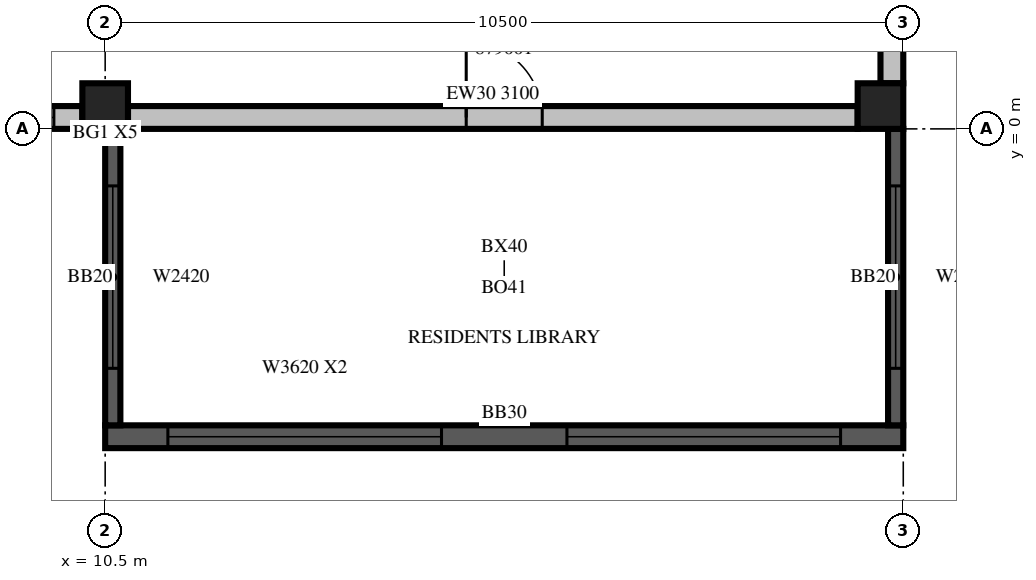
"""IFC4 building model, lengths in metres.
Left out: names, types, materials, properties, quantities, classifications, styles, units other than length and angle.
Written with IfcOpenShell. Run it as: python <this file> out.ifc"""

import sys

from ifc_helpers import new_model, si_unit, direction, frame, frame_2d, origin, origin_2d, place, context, subcontext, project, spatial, rectangle, extrude, source, transform, mapped, element, fill, save


model = new_model("IFC4")
c1 = context("Model", 3, precision=1e-05, world=origin(), true_north=direction((0.0, 1.0)))
c2 = subcontext(c1, "Body", "Model", "MODEL_VIEW")
j1 = project(units=[si_unit("LENGTHUNIT", "METRE"), si_unit("PLANEANGLEUNIT", "RADIAN")], contexts=[c1])
p1 = place(None, origin())
s1 = spatial("IfcSite", under=j1, at=p1, CompositionType="ELEMENT")
p2 = place(p1, origin())
s2 = spatial("IfcBuilding", under=s1, at=p2, CompositionType="ELEMENT")
p3 = place(p2, frame((0.0, 0.0, 337.0)))
s3 = spatial("IfcBuildingStorey", under=s2, at=p3, CompositionType="ELEMENT", Elevation=337.0)
m1 = source(origin(), c2, "Body", "SweptSolid", [
    extrude(rectangle(XDim=0.6, YDim=0.6, at=origin_2d()), origin(), (0.0, 0.0, 1.0), 3.5),
])
for number, where, z_axis, x_axis in (
    (1, (10.5, 0.3, 0.0), (0.0, 0.0, 1.0), (1.0, 0.0, 0.0)),
    (2, (20.7, 0.3, 0.0), (0.0, 0.0, 1.0), (1.0, 0.0, 0.0)),
):
    element("IfcColumn", number, at=place(p3, frame(where, z_axis=z_axis, x_axis=x_axis)), inside=s3, PredefinedType="COLUMN", context=c2, shape_type="MappedRepresentation", body=[
        mapped(m1, transform((0.0, 0.0, 0.0), scale=1.0)),
    ])
p4 = place(p3, frame((10.5, -4.05, 0.0), z_axis=(0.0, 0.0, 1.0), x_axis=(1.0, 0.0, 0.0)))
e3 = element("IfcWall", 3, at=p4, inside=s3, PredefinedType="SOLIDWALL", context=c2, shape_type="SweptSolid", body=[
    extrude(rectangle(XDim=10.5, YDim=0.3, at=frame_2d((5.25, 0.0))), origin(), (0.0, 0.0, 1.0), 3.1),
])
m2 = source(origin(), c2, "Body", "SweptSolid", [
    extrude(rectangle(XDim=3.6, YDim=2.0, at=frame_2d((1.8, 1.0))), frame((0.0, 0.16, 0.0), z_axis=(0.0, -1.0, 0.0), x_axis=(1.0, 0.0, 0.0)), (0.0, 0.0, 1.0), 0.32),
])
p5 = place(p4, frame((0.825, 0.0, 0.6)))
e4 = element("IfcOpeningElement", 4, at=p5, cuts=e3, PredefinedType="OPENING", context=c2, shape_type="MappedRepresentation", body=[
    mapped(m2, transform((0.0, 0.0, 0.0), scale=1.0)),
])
p6 = place(p4, frame((6.075, 0.0, 0.6)))
e5 = element("IfcOpeningElement", 5, at=p6, cuts=e3, PredefinedType="OPENING", context=c2, shape_type="MappedRepresentation", body=[
    mapped(m2, transform((0.0, 0.0, 0.0), scale=1.0)),
])
m3 = source(origin(), c2, "Body", "SweptSolid", [
    extrude(rectangle(XDim=3.9, YDim=0.2, at=frame_2d((1.95, 0.0))), origin(), (0.0, 0.0, 1.0), 3.1),
])
p7 = place(p3, frame((10.6, 0.0, 0.0), z_axis=(0.0, 0.0, 1.0), x_axis=(0.0, -1.0, 0.0)))
e6 = element("IfcWall", 6, at=p7, inside=s3, PredefinedType="SOLIDWALL", context=c2, shape_type="MappedRepresentation", body=[
    mapped(m3, transform((0.0, 0.0, 0.0), scale=1.0)),
])
m4 = source(origin(), c2, "Body", "SweptSolid", [
    extrude(rectangle(XDim=2.4, YDim=2.0, at=frame_2d((1.2, 1.0))), frame((0.0, 0.11, 0.0), z_axis=(0.0, -1.0, 0.0), x_axis=(1.0, 0.0, 0.0)), (0.0, 0.0, 1.0), 0.22),
])
p8 = place(p7, frame((0.75, 0.0, 0.6)))
e7 = element("IfcOpeningElement", 7, at=p8, cuts=e6, PredefinedType="OPENING", context=c2, shape_type="MappedRepresentation", body=[
    mapped(m4, transform((0.0, 0.0, 0.0), scale=1.0)),
])
p9 = place(p3, frame((20.9, 0.0, 0.0), z_axis=(0.0, 0.0, 1.0), x_axis=(0.0, -1.0, 0.0)))
e8 = element("IfcWall", 8, at=p9, inside=s3, PredefinedType="SOLIDWALL", context=c2, shape_type="MappedRepresentation", body=[
    mapped(m3, transform((0.0, 0.0, 0.0), scale=1.0)),
])
p10 = place(p9, frame((0.75, 0.0, 0.6)))
e9 = element("IfcOpeningElement", 9, at=p10, cuts=e8, PredefinedType="OPENING", context=c2, shape_type="MappedRepresentation", body=[
    mapped(m4, transform((0.0, 0.0, 0.0), scale=1.0)),
])
m5 = source(origin(), c2, "Body", "SweptSolid", [
    extrude(rectangle(XDim=6.0, YDim=0.3, at=frame_2d((3.0, 0.0))), origin(), (0.0, 0.0, 1.0), 3.1),
])
p11 = place(p3, frame((4.2, 0.15, 0.0), z_axis=(0.0, 0.0, 1.0), x_axis=(1.0, 0.0, 0.0)))
e10 = element("IfcWall", 10, at=p11, inside=s3, PredefinedType="STANDARD", context=c2, shape_type="MappedRepresentation", body=[
    mapped(m5, transform((0.0, 0.0, 0.0), scale=1.0)),
])
m6 = source(origin(), c2, "Body", "SweptSolid", [
    extrude(rectangle(XDim=1.8, YDim=2.0, at=frame_2d((0.9, 1.0))), frame((0.0, 0.16, 0.0), z_axis=(0.0, -1.0, 0.0), x_axis=(1.0, 0.0, 0.0)), (0.0, 0.0, 1.0), 0.32),
])
p12 = place(p11, frame((0.675, 0.0, 0.6)))
e11 = element("IfcOpeningElement", 11, at=p12, cuts=e10, PredefinedType="OPENING", context=c2, shape_type="MappedRepresentation", body=[
    mapped(m6, transform((0.0, 0.0, 0.0), scale=1.0)),
])
p13 = place(p11, frame((3.825, 0.0, 0.6)))
e12 = element("IfcOpeningElement", 12, at=p13, cuts=e10, PredefinedType="OPENING", context=c2, shape_type="MappedRepresentation", body=[
    mapped(m6, transform((0.0, 0.0, 0.0), scale=1.0)),
])
m7 = source(origin(), c2, "Body", "SweptSolid", [
    extrude(rectangle(XDim=9.6, YDim=0.3, at=frame_2d((4.8, 0.0))), origin(), (0.0, 0.0, 1.0), 3.1),
])
p14 = place(p3, frame((10.8, 0.15, 0.0), z_axis=(0.0, 0.0, 1.0), x_axis=(1.0, 0.0, 0.0)))
e13 = element("IfcWall", 13, at=p14, inside=s3, PredefinedType="STANDARD", context=c2, shape_type="MappedRepresentation", body=[
    mapped(m7, transform((0.0, 0.0, 0.0), scale=1.0)),
])
m8 = source(origin(), c2, "Body", "SweptSolid", [
    extrude(rectangle(XDim=1.0, YDim=2.1, at=frame_2d((0.5, 1.05))), frame((0.0, 0.16, 0.0), z_axis=(0.0, -1.0, 0.0), x_axis=(1.0, 0.0, 0.0)), (0.0, 0.0, 1.0), 0.32),
])
p15 = place(p14, frame((4.45, 0.0, 0.0)))
e14 = element("IfcOpeningElement", 14, at=p15, cuts=e13, PredefinedType="OPENING", context=c2, shape_type="MappedRepresentation", body=[
    mapped(m8, transform((0.0, 0.0, 0.0), scale=1.0)),
])
m9 = source(origin(), c2, "Body", "SweptSolid", [
    extrude(rectangle(XDim=3.0, YDim=0.3, at=frame_2d((1.5, 0.0))), origin(), (0.0, 0.0, 1.0), 3.1),
])
p16 = place(p3, frame((20.85, 0.6, 0.0), z_axis=(0.0, 0.0, 1.0), x_axis=(0.0, 1.0, 0.0)))
e15 = element("IfcWall", 15, at=p16, inside=s3, PredefinedType="STANDARD", context=c2, shape_type="MappedRepresentation", body=[
    mapped(m9, transform((0.0, 0.0, 0.0), scale=1.0)),
])
m10 = source(origin(), c2, "Body", "SweptSolid", [
    extrude(rectangle(XDim=1.2, YDim=2.0, at=frame_2d((0.6, 1.0))), frame((0.0, 0.16, 0.0), z_axis=(0.0, -1.0, 0.0), x_axis=(1.0, 0.0, 0.0)), (0.0, 0.0, 1.0), 0.32),
])
p17 = place(p16, frame((1.425, 0.0, 0.6)))
e16 = element("IfcOpeningElement", 16, at=p17, cuts=e15, PredefinedType="OPENING", context=c2, shape_type="MappedRepresentation", body=[
    mapped(m10, transform((0.0, 0.0, 0.0), scale=1.0)),
])
m11 = source(origin(), c2, "Body", "SweptSolid", [
    extrude(rectangle(XDim=3.6, YDim=2.0, at=frame_2d((1.8, 1.0))), frame((0.0, 0.03, 0.0), z_axis=(0.0, -1.0, 0.0), x_axis=(1.0, 0.0, 0.0)), (0.0, 0.0, 1.0), 0.06),
])
p18 = place(p5, origin())
e17 = element("IfcWindow", 17, at=p18, inside=s3, PartitioningType="SINGLE_PANEL", PredefinedType="WINDOW", context=c2, shape_type="MappedRepresentation", body=[
    mapped(m11, transform((0.0, 0.0, 0.0), scale=1.0)),
])
fill(e4, e17)
p19 = place(p6, origin())
e18 = element("IfcWindow", 18, at=p19, inside=s3, PartitioningType="SINGLE_PANEL", PredefinedType="WINDOW", context=c2, shape_type="MappedRepresentation", body=[
    mapped(m11, transform((0.0, 0.0, 0.0), scale=1.0)),
])
fill(e5, e18)
m12 = source(origin(), c2, "Body", "SweptSolid", [
    extrude(rectangle(XDim=2.4, YDim=2.0, at=frame_2d((1.2, 1.0))), frame((0.0, 0.03, 0.0), z_axis=(0.0, -1.0, 0.0), x_axis=(1.0, 0.0, 0.0)), (0.0, 0.0, 1.0), 0.06),
])
p20 = place(p8, origin())
e19 = element("IfcWindow", 19, at=p20, inside=s3, PartitioningType="SINGLE_PANEL", PredefinedType="WINDOW", context=c2, shape_type="MappedRepresentation", body=[
    mapped(m12, transform((0.0, 0.0, 0.0), scale=1.0)),
])
fill(e7, e19)
p21 = place(p10, origin())
e20 = element("IfcWindow", 20, at=p21, inside=s3, PartitioningType="SINGLE_PANEL", PredefinedType="WINDOW", context=c2, shape_type="MappedRepresentation", body=[
    mapped(m12, transform((0.0, 0.0, 0.0), scale=1.0)),
])
fill(e9, e20)
m13 = source(origin(), c2, "Body", "SweptSolid", [
    extrude(rectangle(XDim=1.8, YDim=2.0, at=frame_2d((0.9, 1.0))), frame((0.0, 0.03, 0.0), z_axis=(0.0, -1.0, 0.0), x_axis=(1.0, 0.0, 0.0)), (0.0, 0.0, 1.0), 0.06),
])
p22 = place(p13, origin())
e21 = element("IfcWindow", 21, at=p22, inside=s3, PartitioningType="SINGLE_PANEL", PredefinedType="WINDOW", context=c2, shape_type="MappedRepresentation", body=[
    mapped(m13, transform((0.0, 0.0, 0.0), scale=1.0)),
])
fill(e12, e21)
m14 = source(origin(), c2, "Body", "SweptSolid", [
    extrude(rectangle(XDim=1.0, YDim=2.1, at=frame_2d((0.5, 1.05))), frame((0.0, 0.025, 0.0), z_axis=(0.0, -1.0, 0.0), x_axis=(1.0, 0.0, 0.0)), (0.0, 0.0, 1.0), 0.05),
])
p23 = place(p15, origin())
e22 = element("IfcDoor", 22, at=p23, inside=s3, OperationType="SINGLE_SWING_LEFT", PredefinedType="DOOR", context=c2, shape_type="MappedRepresentation", body=[
    mapped(m14, transform((0.0, 0.0, 0.0), scale=1.0)),
])
fill(e14, e22)
save(model, sys.argv[1])
